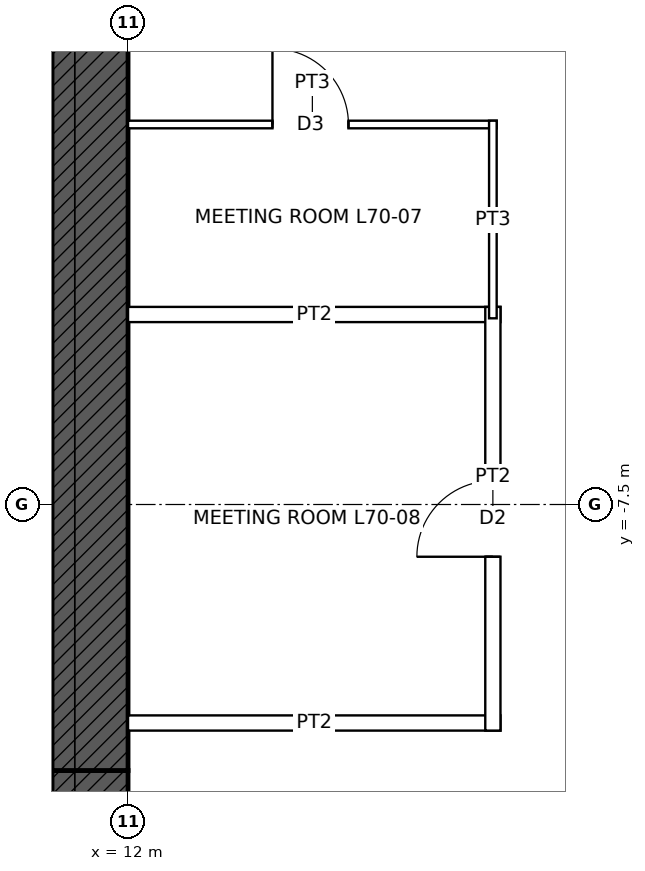
"""IFC4 building model, lengths in metres.
Left out: names, types, materials, properties, quantities, classifications, styles, units other than length and angle.
Written with IfcOpenShell. Run it as: python <this file> out.ifc"""

import sys

from ifc_helpers import new_model, si_unit, direction, frame, frame_2d, origin, place, context, subcontext, project, spatial, rectangle, extrude, element, fill, save


model = new_model("IFC4")
c1 = context("Model", 3, precision=1e-05, world=origin(), true_north=direction((0.0, 1.0)))
c2 = subcontext(c1, "Body", "Model", "MODEL_VIEW")
j1 = project(units=[si_unit("LENGTHUNIT", "METRE"), si_unit("PLANEANGLEUNIT", "RADIAN")], contexts=[c1])
p1 = place(None, origin())
s1 = spatial("IfcSite", under=j1, at=p1, CompositionType="ELEMENT")
p2 = place(p1, origin())
s2 = spatial("IfcBuilding", under=s1, at=p2, CompositionType="ELEMENT")
p3 = place(p2, frame((0.0, 0.0, 315.9)))
s3 = spatial("IfcBuildingStorey", under=s2, at=p3, CompositionType="ELEMENT", Elevation=315.9)
p4 = place(p3, frame((12.0, -11.5, 0.0), z_axis=(0.0, 0.0, 1.0), x_axis=(-1.0, 0.0, 0.0)))
e1 = element("IfcWall", 1, at=p4, inside=s3, PredefinedType="SHEAR", context=c2, shape_type="SweptSolid", body=[
    extrude(rectangle(XDim=24.0, YDim=1.0, at=frame_2d((12.0, 0.0))), origin(), (0.0, 0.0, 1.0), 4.0),
])
p5 = place(p4, frame((11.5, 0.0, 0.0)))
e2 = element("IfcOpeningElement", 2, at=p5, cuts=e1, PredefinedType="OPENING", context=c2, shape_type="SweptSolid", body=[
    extrude(rectangle(XDim=1.0, YDim=2.1, at=frame_2d((0.5, 1.05))), frame((0.0, 0.51, 0.0), z_axis=(0.0, -1.0, 0.0), x_axis=(1.0, 0.0, 0.0)), (0.0, 0.0, 1.0), 1.02),
])
p6 = place(p4, frame((1.0, 0.0, 0.0)))
e3 = element("IfcOpeningElement", 3, at=p6, cuts=e1, PredefinedType="OPENING", context=c2, shape_type="SweptSolid", body=[
    extrude(rectangle(XDim=1.0, YDim=2.4, at=frame_2d((0.5, 1.2))), frame((0.0, 0.51, 0.0), z_axis=(0.0, -1.0, 0.0), x_axis=(1.0, 0.0, 0.0)), (0.0, 0.0, 1.0), 1.02),
])
p7 = place(p3, frame((11.5, 11.0, 0.0), z_axis=(0.0, 0.0, 1.0), x_axis=(0.0, -1.0, 0.0)))
e4 = element("IfcWall", 4, at=p7, inside=s3, PredefinedType="SHEAR", context=c2, shape_type="SweptSolid", body=[
    extrude(rectangle(XDim=22.0, YDim=1.0, at=frame_2d((11.0, 0.0))), origin(), (0.0, 0.0, 1.0), 4.0),
])
p8 = place(p7, frame((10.5, 0.0, 0.0)))
e5 = element("IfcOpeningElement", 5, at=p8, cuts=e4, PredefinedType="OPENING", context=c2, shape_type="SweptSolid", body=[
    extrude(rectangle(XDim=1.0, YDim=2.4, at=frame_2d((0.5, 1.2))), frame((0.0, 0.51, 0.0), z_axis=(0.0, -1.0, 0.0), x_axis=(1.0, 0.0, 0.0)), (0.0, 0.0, 1.0), 1.02),
])
for number, where, z_axis, x_axis in (
    (6, (12.0, -10.375, 0.0), (0.0, 0.0, 1.0), (1.0, 0.0, 0.0)),
    (7, (12.0, -5.0, 0.0), (0.0, 0.0, 1.0), (1.0, 0.0, 0.0)),
):
    element("IfcWall", number, at=place(p3, frame(where, z_axis=z_axis, x_axis=x_axis)), inside=s3, PredefinedType="PARTITIONING", context=c2, shape_type="SweptSolid", body=[
        extrude(rectangle(XDim=4.9, YDim=0.2, at=frame_2d((2.45, 0.0))), origin(), (0.0, 0.0, 1.0), 3.85),
    ])
p9 = place(p3, frame((12.0, -2.5, 0.0), z_axis=(0.0, 0.0, 1.0), x_axis=(1.0, 0.0, 0.0)))
e8 = element("IfcWall", 8, at=p9, inside=s3, PredefinedType="PARTITIONING", context=c2, shape_type="SweptSolid", body=[
    extrude(rectangle(XDim=4.85, YDim=0.1, at=frame_2d((2.425, 0.0))), origin(), (0.0, 0.0, 1.0), 3.85),
])
p10 = place(p9, frame((1.9, 0.0, 0.0)))
e9 = element("IfcOpeningElement", 9, at=p10, cuts=e8, PredefinedType="OPENING", context=c2, shape_type="SweptSolid", body=[
    extrude(rectangle(XDim=1.0, YDim=2.1, at=frame_2d((0.5, 1.05))), frame((0.0, 0.06, 0.0), z_axis=(0.0, -1.0, 0.0), x_axis=(1.0, 0.0, 0.0)), (0.0, 0.0, 1.0), 0.12),
])
p11 = place(p3, frame((16.8, -10.475, 0.0), z_axis=(0.0, 0.0, 1.0), x_axis=(0.0, 1.0, 0.0)))
e10 = element("IfcWall", 10, at=p11, inside=s3, PredefinedType="PARTITIONING", context=c2, shape_type="SweptSolid", body=[
    extrude(rectangle(XDim=5.575, YDim=0.2, at=frame_2d((2.788, 0.0))), origin(), (0.0, 0.0, 1.0), 3.85),
])
p12 = place(p11, frame((2.288, 0.0, 0.0)))
e11 = element("IfcOpeningElement", 11, at=p12, cuts=e10, PredefinedType="OPENING", context=c2, shape_type="SweptSolid", body=[
    extrude(rectangle(XDim=1.0, YDim=2.1, at=frame_2d((0.5, 1.05))), frame((0.0, 0.11, 0.0), z_axis=(0.0, -1.0, 0.0), x_axis=(1.0, 0.0, 0.0)), (0.0, 0.0, 1.0), 0.22),
])
p13 = place(p3, frame((16.8, -5.05, 0.0), z_axis=(0.0, 0.0, 1.0), x_axis=(0.0, 1.0, 0.0)))
e12 = element("IfcWall", 12, at=p13, inside=s3, PredefinedType="PARTITIONING", context=c2, shape_type="SweptSolid", body=[
    extrude(rectangle(XDim=2.6, YDim=0.1, at=frame_2d((1.3, 0.0))), origin(), (0.0, 0.0, 1.0), 3.85),
])
p14 = place(p10, origin())
e13 = element("IfcDoor", 13, at=p14, inside=s3, OperationType="SINGLE_SWING_LEFT", PredefinedType="DOOR", context=c2, shape_type="SweptSolid", body=[
    extrude(rectangle(XDim=1.0, YDim=2.1, at=frame_2d((0.5, 1.05))), frame((0.0, 0.025, 0.0), z_axis=(0.0, -1.0, 0.0), x_axis=(1.0, 0.0, 0.0)), (0.0, 0.0, 1.0), 0.05),
])
fill(e9, e13)
p15 = place(p12, origin())
e14 = element("IfcDoor", 14, at=p15, inside=s3, OperationType="SINGLE_SWING_LEFT", PredefinedType="DOOR", context=c2, shape_type="SweptSolid", body=[
    extrude(rectangle(XDim=1.0, YDim=2.1, at=frame_2d((0.5, 1.05))), frame((0.0, 0.025, 0.0), z_axis=(0.0, -1.0, 0.0), x_axis=(1.0, 0.0, 0.0)), (0.0, 0.0, 1.0), 0.05),
])
fill(e11, e14)
save(model, sys.argv[1])
